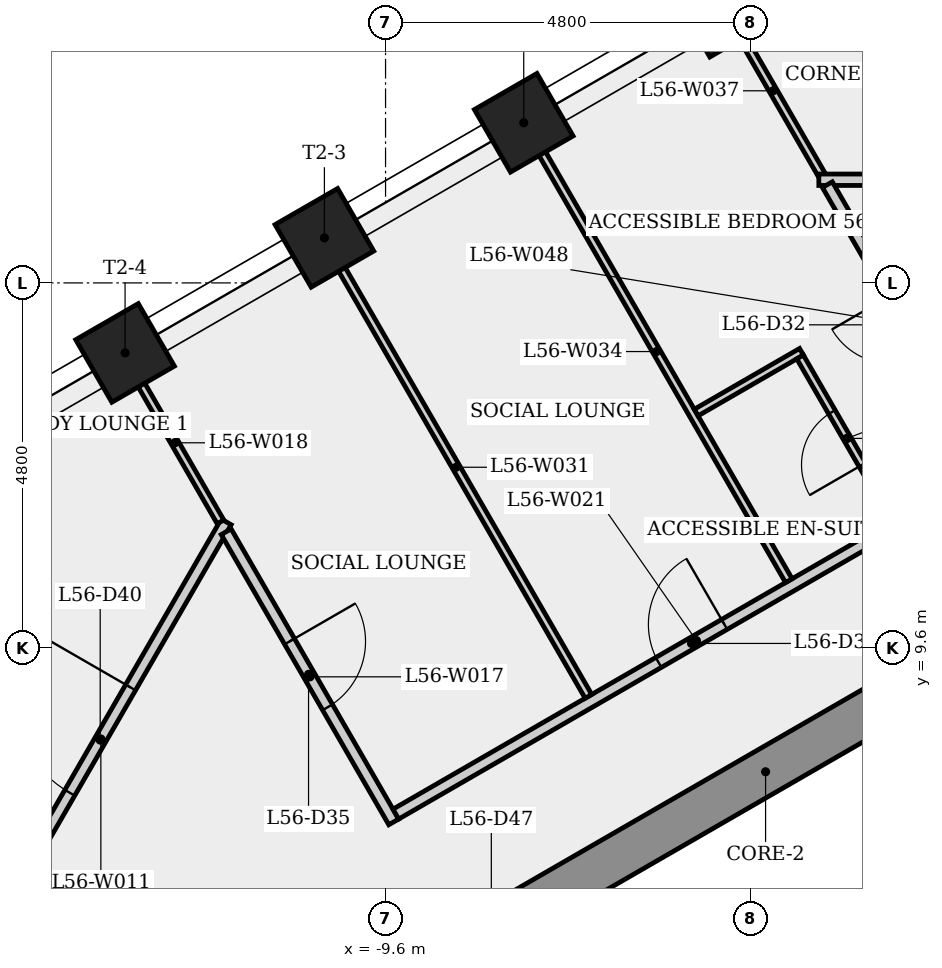
"""IFC4 building model, lengths in metres.
Left out: names, types, materials, properties, quantities, classifications, styles, units other than length and angle.
Written with IfcOpenShell. Run it as: python <this file> out.ifc"""

import sys

from ifc_helpers import new_model, si_unit, direction, frame, frame_2d, origin, origin_2d, place, context, subcontext, project, spatial, rectangle, extrude, element, fill, save


model = new_model("IFC4")
c1 = context("Model", 3, precision=1e-05, world=origin(), true_north=direction((0.0, 1.0)))
c2 = subcontext(c1, "Body", "Model", "MODEL_VIEW")
j1 = project(units=[si_unit("LENGTHUNIT", "METRE"), si_unit("PLANEANGLEUNIT", "RADIAN")], contexts=[c1])
p1 = place(None, origin())
s1 = spatial("IfcSite", under=j1, at=p1, CompositionType="ELEMENT")
p2 = place(p1, origin())
s2 = spatial("IfcBuilding", under=s1, at=p2, CompositionType="ELEMENT")
p3 = place(p2, frame((0.0, 0.0, 210.1)))
s3 = spatial("IfcBuildingStorey", under=s2, at=p3, CompositionType="ELEMENT", Elevation=210.1)
p4 = place(p3, frame((0.15, 10.71, 0.0), z_axis=(0.0, 0.0, 1.0), x_axis=(-0.866023993627, -0.500002442456, 0.0)))
e1 = element("IfcWall", 1, at=p4, inside=s3, PredefinedType="SHEAR", context=c2, shape_type="SweptSolid", body=[
    extrude(rectangle(XDim=10.97, YDim=0.6, at=frame_2d((5.485, 0.0))), origin(), (0.0, 0.0, 1.0), 4.0),
])
p5 = place(p4, frame((9.201, 0.0, 0.0)))
e2 = element("IfcOpeningElement", 2, at=p5, cuts=e1, PredefinedType="OPENING", context=c2, shape_type="SweptSolid", body=[
    extrude(rectangle(XDim=0.9, YDim=2.1, at=frame_2d((0.45, 1.05))), frame((0.0, 0.31, 0.0), z_axis=(0.0, -1.0, 0.0), x_axis=(1.0, 0.0, 0.0)), (0.0, 0.0, 1.0), 0.62),
])
p6 = place(p4, frame((1.744, 0.0, 0.0)))
e3 = element("IfcOpeningElement", 3, at=p6, cuts=e1, PredefinedType="OPENING", context=c2, shape_type="SweptSolid", body=[
    extrude(rectangle(XDim=0.9, YDim=2.1, at=frame_2d((0.45, 1.05))), frame((0.0, 0.31, 0.0), z_axis=(0.0, -1.0, 0.0), x_axis=(1.0, 0.0, 0.0)), (0.0, 0.0, 1.0), 0.62),
])
for number, where, z_axis, x_axis in (
    (4, (-5.159, 18.021, 0.0), (0.0, 0.0, 1.0), (-0.5, 0.866, 0.0)),
    (5, (-7.782, 16.507, 0.0), (0.0, 0.0, 1.0), (-0.5, 0.866, 0.0)),
    (6, (-10.405, 14.993, 0.0), (0.0, 0.0, 1.0), (-0.5, 0.866, 0.0)),
    (7, (-13.027, 13.479, 0.0), (0.0, 0.0, 1.0), (-0.5, 0.866, 0.0)),
):
    element("IfcColumn", number, at=place(p3, frame(where, z_axis=z_axis, x_axis=x_axis)), inside=s3, PredefinedType="COLUMN", context=c2, shape_type="SweptSolid", body=[
        extrude(rectangle(XDim=0.95, YDim=0.95, at=origin_2d()), origin(), (0.0, 0.0, 1.0), 4.0),
    ])
p7 = place(p3, frame((-14.995, 5.543, 0.0), z_axis=(0.0, 0.0, 1.0), x_axis=(0.500000102728, 0.866025344474, 0.0)))
e8 = element("IfcWall", 8, at=p7, inside=s3, PredefinedType="PARTITIONING", context=c2, shape_type="SweptSolid", body=[
    extrude(rectangle(XDim=6.597, YDim=0.15, at=frame_2d((3.298, 0.0))), origin(), (0.0, 0.0, 1.0), 3.6),
])
p8 = place(p7, frame((2.481, 0.0, 0.0)))
e9 = element("IfcOpeningElement", 9, at=p8, cuts=e8, PredefinedType="OPENING", context=c2, shape_type="SweptSolid", body=[
    extrude(rectangle(XDim=1.6, YDim=2.1, at=frame_2d((0.8, 1.05))), frame((0.0, 0.085, 0.0), z_axis=(0.0, -1.0, 0.0), x_axis=(1.0, 0.0, 0.0)), (0.0, 0.0, 1.0), 0.17),
])
p9 = place(p3, frame((-11.697, 11.126, 0.0), z_axis=(0.0, 0.0, 1.0), x_axis=(0.499992488471, -0.866029740524, 0.0)))
e10 = element("IfcWall", 10, at=p9, inside=s3, PredefinedType="PARTITIONING", context=c2, shape_type="SweptSolid", body=[
    extrude(rectangle(XDim=4.409, YDim=0.15, at=frame_2d((2.204, 0.0))), origin(), (0.0, 0.0, 1.0), 3.6),
])
p10 = place(p9, frame((1.667, 0.0, 0.0)))
e11 = element("IfcOpeningElement", 11, at=p10, cuts=e10, PredefinedType="OPENING", context=c2, shape_type="SweptSolid", body=[
    extrude(rectangle(XDim=1.0, YDim=2.1, at=frame_2d((0.5, 1.05))), frame((0.0, 0.085, 0.0), z_axis=(0.0, -1.0, 0.0), x_axis=(1.0, 0.0, 0.0)), (0.0, 0.0, 1.0), 0.17),
])
p11 = place(p3, frame((-11.771, 11.256, 0.0), z_axis=(0.0, 0.0, 1.0), x_axis=(-0.50000677744, 0.866021490792, 0.0)))
e12 = element("IfcWall", 12, at=p11, inside=s3, PredefinedType="PARTITIONING", context=c2, shape_type="SweptSolid", body=[
    extrude(rectangle(XDim=2.403, YDim=0.1, at=frame_2d((1.202, 0.0))), origin(), (0.0, 0.0, 1.0), 3.6),
])
p12 = place(p3, frame((-9.465, 7.41, 0.0), z_axis=(0.0, 0.0, 1.0), x_axis=(0.866025334581, 0.500000119864, 0.0)))
e13 = element("IfcWall", 13, at=p12, inside=s3, PredefinedType="PARTITIONING", context=c2, shape_type="SweptSolid", body=[
    extrude(rectangle(XDim=9.133, YDim=0.15, at=frame_2d((4.567, 0.0))), origin(), (0.0, 0.0, 1.0), 3.6),
])
p13 = place(p12, frame((3.992, 0.0, 0.0)))
e14 = element("IfcOpeningElement", 14, at=p13, cuts=e13, PredefinedType="OPENING", context=c2, shape_type="SweptSolid", body=[
    extrude(rectangle(XDim=1.0, YDim=2.1, at=frame_2d((0.5, 1.05))), frame((0.0, 0.085, 0.0), z_axis=(0.0, -1.0, 0.0), x_axis=(1.0, 0.0, 0.0)), (0.0, 0.0, 1.0), 0.17),
])
p14 = place(p3, frame((-6.931, 8.96, 0.0), z_axis=(0.0, 0.0, 1.0), x_axis=(-0.499982511794, 0.866035500369, 0.0)))
e15 = element("IfcWall", 15, at=p14, inside=s3, PredefinedType="PARTITIONING", context=c2, shape_type="SweptSolid", body=[
    extrude(rectangle(XDim=6.962, YDim=0.1, at=frame_2d((3.481, 0.0))), origin(), (0.0, 0.0, 1.0), 3.6),
])
p15 = place(p3, frame((-7.775, 16.511, 0.0), z_axis=(0.0, 0.0, 1.0), x_axis=(0.499997697262, -0.866026733267, 0.0)))
e16 = element("IfcWall", 16, at=p15, inside=s3, PredefinedType="PARTITIONING", context=c2, shape_type="SweptSolid", body=[
    extrude(rectangle(XDim=6.961, YDim=0.1, at=frame_2d((3.481, 0.0))), origin(), (0.0, 0.0, 1.0), 3.6),
])
p16 = place(p3, frame((-4.128, 13.494, 0.0), z_axis=(0.0, 0.0, 1.0), x_axis=(-0.866094119867, -0.499880961361, 0.0)))
e17 = element("IfcWall", 17, at=p16, inside=s3, PredefinedType="PARTITIONING", context=c2, shape_type="SweptSolid", body=[
    extrude(rectangle(XDim=1.6, YDim=0.1, at=frame_2d((0.8, 0.0))), origin(), (0.0, 0.0, 1.0), 3.6),
])
p17 = place(p3, frame((-3.862, 15.823, 0.0), z_axis=(0.0, 0.0, 1.0), x_axis=(-0.5000066933, 0.866021539371, 0.0)))
e18 = element("IfcWall", 18, at=p17, inside=s3, PredefinedType="PARTITIONING", context=c2, shape_type="SweptSolid", body=[
    extrude(rectangle(XDim=2.553, YDim=0.1, at=frame_2d((1.276, 0.0))), origin(), (0.0, 0.0, 1.0), 3.6),
])
p18 = place(p3, frame((-3.899, 15.757, 0.0), z_axis=(0.0, 0.0, 1.0), x_axis=(1.0, 0.0, 0.0)))
e19 = element("IfcWall", 19, at=p18, inside=s3, PredefinedType="PARTITIONING", context=c2, shape_type="SweptSolid", body=[
    extrude(rectangle(XDim=4.558, YDim=0.15, at=frame_2d((2.279, 0.0))), origin(), (0.0, 0.0, 1.0), 3.6),
])
p19 = place(p18, frame((1.139, 0.0, 0.0)))
e20 = element("IfcOpeningElement", 20, at=p19, cuts=e19, PredefinedType="OPENING", context=c2, shape_type="SweptSolid", body=[
    extrude(rectangle(XDim=0.9, YDim=2.1, at=frame_2d((0.45, 1.05))), frame((0.0, 0.085, 0.0), z_axis=(0.0, -1.0, 0.0), x_axis=(1.0, 0.0, 0.0)), (0.0, 0.0, 1.0), 0.17),
])
p20 = place(p3, frame((-2.909, 11.282, 0.0), z_axis=(0.0, 0.0, 1.0), x_axis=(-0.499916002032, 0.866073894602, 0.0)))
e21 = element("IfcWall", 21, at=p20, inside=s3, PredefinedType="PARTITIONING", context=c2, shape_type="SweptSolid", body=[
    extrude(rectangle(XDim=2.475, YDim=0.1, at=frame_2d((1.238, 0.0))), origin(), (0.0, 0.0, 1.0), 3.6),
])
p21 = place(p20, frame((0.837, 0.0, 0.0)))
e22 = element("IfcOpeningElement", 22, at=p21, cuts=e21, PredefinedType="OPENING", context=c2, shape_type="SweptSolid", body=[
    extrude(rectangle(XDim=0.8, YDim=2.1, at=frame_2d((0.4, 1.05))), frame((0.0, 0.06, 0.0), z_axis=(0.0, -1.0, 0.0), x_axis=(1.0, 0.0, 0.0)), (0.0, 0.0, 1.0), 0.12),
])
p22 = place(p3, frame((-1.658, 12.004, 0.0), z_axis=(0.0, 0.0, 1.0), x_axis=(-0.500023511883, 0.866011828767, 0.0)))
e23 = element("IfcWall", 23, at=p22, inside=s3, PredefinedType="PARTITIONING", context=c2, shape_type="SweptSolid", body=[
    extrude(rectangle(XDim=4.259, YDim=0.15, at=frame_2d((2.129, 0.0))), origin(), (0.0, 0.0, 1.0), 3.6),
])
p23 = place(p22, frame((1.679, 0.0, 0.0)))
e24 = element("IfcOpeningElement", 24, at=p23, cuts=e23, PredefinedType="OPENING", context=c2, shape_type="SweptSolid", body=[
    extrude(rectangle(XDim=0.9, YDim=2.1, at=frame_2d((0.45, 1.05))), frame((0.0, 0.085, 0.0), z_axis=(0.0, -1.0, 0.0), x_axis=(1.0, 0.0, 0.0)), (0.0, 0.0, 1.0), 0.17),
])
p24 = place(p21, origin())
e25 = element("IfcDoor", 25, at=p24, inside=s3, OperationType="SINGLE_SWING_LEFT", PredefinedType="DOOR", context=c2, shape_type="SweptSolid", body=[
    extrude(rectangle(XDim=0.8, YDim=2.1, at=frame_2d((0.4, 1.05))), frame((0.0, 0.025, 0.0), z_axis=(0.0, -1.0, 0.0), x_axis=(1.0, 0.0, 0.0)), (0.0, 0.0, 1.0), 0.05),
])
fill(e22, e25)
p25 = place(p13, origin())
e26 = element("IfcDoor", 26, at=p25, inside=s3, OperationType="SINGLE_SWING_RIGHT", PredefinedType="DOOR", context=c2, shape_type="SweptSolid", body=[
    extrude(rectangle(XDim=1.0, YDim=2.1, at=frame_2d((0.5, 1.05))), frame((0.0, 0.025, 0.0), z_axis=(0.0, -1.0, 0.0), x_axis=(1.0, 0.0, 0.0)), (0.0, 0.0, 1.0), 0.05),
])
fill(e14, e26)
p26 = place(p10, origin())
e27 = element("IfcDoor", 27, at=p26, inside=s3, OperationType="SINGLE_SWING_LEFT", PredefinedType="DOOR", context=c2, shape_type="SweptSolid", body=[
    extrude(rectangle(XDim=1.0, YDim=2.1, at=frame_2d((0.5, 1.05))), frame((0.0, 0.025, 0.0), z_axis=(0.0, -1.0, 0.0), x_axis=(1.0, 0.0, 0.0)), (0.0, 0.0, 1.0), 0.05),
])
fill(e11, e27)
p27 = place(p8, origin())
e28 = element("IfcDoor", 28, at=p27, inside=s3, OperationType="SINGLE_SWING_RIGHT", PredefinedType="DOOR", context=c2, shape_type="SweptSolid", body=[
    extrude(rectangle(XDim=1.6, YDim=2.1, at=frame_2d((0.8, 1.05))), frame((0.0, 0.025, 0.0), z_axis=(0.0, -1.0, 0.0), x_axis=(1.0, 0.0, 0.0)), (0.0, 0.0, 1.0), 0.05),
])
fill(e9, e28)
save(model, sys.argv[1])
